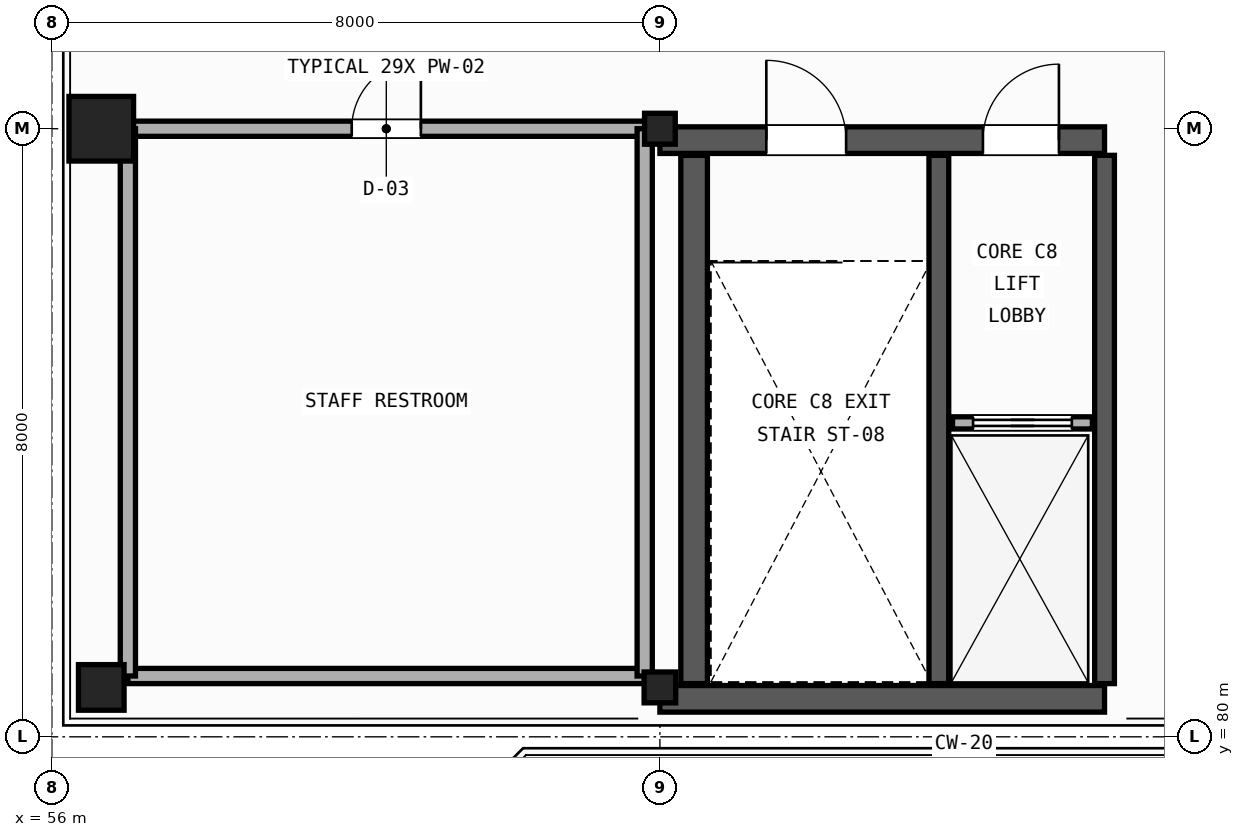
"""IFC4 building model, lengths in metres.
Left out: names, types, materials, properties, quantities, classifications, styles, units other than length and angle.
Written with IfcOpenShell. Run it as: python <this file> out.ifc"""

import sys

from ifc_helpers import new_model, si_unit, direction, frame, frame_2d, origin, origin_2d, place, context, subcontext, project, spatial, rectangle, circle, i_section, extrude, element, fill, save


model = new_model("IFC4")
c1 = context("Model", 3, precision=1e-05, world=origin(), true_north=direction((0.0, 1.0)))
c2 = subcontext(c1, "Body", "Model", "MODEL_VIEW")
j1 = project(units=[si_unit("LENGTHUNIT", "METRE"), si_unit("PLANEANGLEUNIT", "RADIAN")], contexts=[c1])
p1 = place(None, origin())
s1 = spatial("IfcSite", under=j1, at=p1, CompositionType="ELEMENT")
p2 = place(p1, origin())
s2 = spatial("IfcBuilding", under=s1, at=p2, CompositionType="ELEMENT")
p3 = place(p2, frame((0.0, 0.0, 10.2)))
s3 = spatial("IfcBuildingStorey", under=s2, at=p3, CompositionType="ELEMENT", Elevation=10.2)
p4 = place(p3, frame((56.65, 80.65, 0.0), z_axis=(0.0, 0.0, 1.0), x_axis=(1.0, 0.0, 0.0)))
e1 = element("IfcColumn", 1, at=p4, inside=s3, PredefinedType="COLUMN", context=c2, shape_type="SweptSolid", body=[
    extrude(rectangle(XDim=0.6, YDim=0.6, at=origin_2d()), origin(), (0.0, 0.0, 1.0), 4.8),
])
p5 = place(p3, frame((56.65, 88.0, 0.0), z_axis=(0.0, 0.0, 1.0), x_axis=(0.0, 1.0, 0.0)))
e2 = element("IfcColumn", 2, at=p5, inside=s3, PredefinedType="COLUMN", context=c2, shape_type="SweptSolid", body=[
    extrude(circle(Radius=0.425, at=origin_2d()), origin(), (0.0, 0.0, 1.0), 4.8),
])
p6 = place(p3, frame((64.0, 80.65, 0.0), z_axis=(0.0, 0.0, 1.0), x_axis=(0.0, 1.0, 0.0)))
e3 = element("IfcColumn", 3, at=p6, inside=s3, PredefinedType="COLUMN", context=c2, shape_type="SweptSolid", body=[
    extrude(i_section(OverallWidth=0.406, OverallDepth=0.416, WebThickness=0.03, FlangeThickness=0.048, FilletRadius=0.015, at=origin_2d()), origin(), (0.0, 0.0, 1.0), 4.8),
])
p7 = place(p3, frame((64.0, 88.0, 0.0), z_axis=(0.0, 0.0, 1.0), x_axis=(1.0, 0.0, 0.0)))
e4 = element("IfcColumn", 4, at=p7, inside=s3, PredefinedType="COLUMN", context=c2, shape_type="SweptSolid", body=[
    extrude(i_section(OverallWidth=0.404, OverallDepth=0.407, WebThickness=0.027, FlangeThickness=0.044, FilletRadius=0.015, at=origin_2d()), origin(), (0.0, 0.0, 1.0), 6.45),
])
p8 = place(p3, frame((64.0, 87.85, 0.0), z_axis=(0.0, 0.0, 1.0), x_axis=(1.0, 0.0, 0.0)))
e5 = element("IfcWall", 5, at=p8, inside=s3, PredefinedType="SHEAR", context=c2, shape_type="SweptSolid", body=[
    extrude(rectangle(XDim=5.85, YDim=0.35, at=frame_2d((2.925, 0.0))), origin(), (0.0, 0.0, 1.0), 4.3),
])
p9 = place(p8, frame((1.4, 0.0, 0.0)))
e6 = element("IfcOpeningElement", 6, at=p9, cuts=e5, PredefinedType="OPENING", context=c2, shape_type="SweptSolid", body=[
    extrude(rectangle(XDim=1.05, YDim=2.1, at=frame_2d((0.525, 1.05))), frame((0.0, 0.185, 0.0), z_axis=(0.0, -1.0, 0.0), x_axis=(1.0, 0.0, 0.0)), (0.0, 0.0, 1.0), 0.37),
])
p10 = place(p8, frame((4.25, 0.0, 0.0)))
e7 = element("IfcOpeningElement", 7, at=p10, cuts=e5, PredefinedType="OPENING", context=c2, shape_type="SweptSolid", body=[
    extrude(rectangle(XDim=1.0, YDim=2.15, at=frame_2d((0.5, 1.075))), frame((0.0, 0.185, 0.0), z_axis=(0.0, -1.0, 0.0), x_axis=(1.0, 0.0, 0.0)), (0.0, 0.0, 1.0), 0.37),
])
p11 = place(p3, frame((64.0, 80.5, 0.0), z_axis=(0.0, 0.0, 1.0), x_axis=(1.0, 0.0, 0.0)))
e8 = element("IfcWall", 8, at=p11, inside=s3, PredefinedType="SHEAR", context=c2, shape_type="SweptSolid", body=[
    extrude(rectangle(XDim=5.85, YDim=0.35, at=frame_2d((2.925, 0.0))), origin(), (0.0, 0.0, 1.0), 4.3),
])
p12 = place(p3, frame((64.45, 80.7, 0.0), z_axis=(0.0, 0.0, 1.0), x_axis=(0.0, 1.0, 0.0)))
e9 = element("IfcWall", 9, at=p12, inside=s3, PredefinedType="SHEAR", context=c2, shape_type="SweptSolid", body=[
    extrude(rectangle(XDim=6.95, YDim=0.35, at=frame_2d((3.475, 0.0))), origin(), (0.0, 0.0, 1.0), 4.3),
])
for number, where, z_axis, x_axis in (
    (10, (69.85, 80.7, 0.0), (0.0, 0.0, 1.0), (0.0, 1.0, 0.0)),
    (11, (67.67, 80.7, 0.0), (0.0, 0.0, 1.0), (0.0, 1.0, 0.0)),
):
    element("IfcWall", number, at=place(p3, frame(where, z_axis=z_axis, x_axis=x_axis)), inside=s3, PredefinedType="SHEAR", context=c2, shape_type="SweptSolid", body=[
        extrude(rectangle(XDim=6.95, YDim=0.26, at=frame_2d((3.475, 0.0))), origin(), (0.0, 0.0, 1.0), 4.3),
    ])
p13 = place(p3, frame((67.85, 84.13, 0.0), z_axis=(0.0, 0.0, 1.0), x_axis=(1.0, 0.0, 0.0)))
e12 = element("IfcWall", 12, at=p13, inside=s3, PredefinedType="PARTITIONING", context=c2, shape_type="SweptSolid", body=[
    extrude(rectangle(XDim=1.84, YDim=0.16, at=frame_2d((0.92, 0.0))), origin(), (0.0, 0.0, 1.0), 3.6),
])
p14 = place(p13, frame((0.27, 0.0, 0.0)))
e13 = element("IfcOpeningElement", 13, at=p14, cuts=e12, PredefinedType="OPENING", context=c2, shape_type="SweptSolid", body=[
    extrude(rectangle(XDim=1.3, YDim=2.2, at=frame_2d((0.65, 1.1))), frame((0.0, 0.09, 0.0), z_axis=(0.0, -1.0, 0.0), x_axis=(1.0, 0.0, 0.0)), (0.0, 0.0, 1.0), 0.18),
])
p15 = place(p3, frame((57.0, 88.0, 0.0), z_axis=(0.0, 0.0, 1.0), x_axis=(1.0, 0.0, 0.0)))
e14 = element("IfcWall", 14, at=p15, inside=s3, PredefinedType="PLUMBINGWALL", context=c2, shape_type="SweptSolid", body=[
    extrude(rectangle(XDim=6.8, YDim=0.2, at=frame_2d((3.4, 0.0))), origin(), (0.0, 0.0, 1.0), 4.29),
])
p16 = place(p15, frame((2.945, 0.0, 0.0)))
e15 = element("IfcOpeningElement", 15, at=p16, cuts=e14, PredefinedType="OPENING", context=c2, shape_type="SweptSolid", body=[
    extrude(rectangle(XDim=0.91, YDim=2.1, at=frame_2d((0.455, 1.05))), frame((0.0, 0.11, 0.0), z_axis=(0.0, -1.0, 0.0), x_axis=(1.0, 0.0, 0.0)), (0.0, 0.0, 1.0), 0.22),
])
p17 = place(p3, frame((57.0, 80.8, 0.0), z_axis=(0.0, 0.0, 1.0), x_axis=(1.0, 0.0, 0.0)))
e16 = element("IfcWall", 16, at=p17, inside=s3, PredefinedType="PLUMBINGWALL", context=c2, shape_type="SweptSolid", body=[
    extrude(rectangle(XDim=6.8, YDim=0.2, at=frame_2d((3.4, 0.0))), origin(), (0.0, 0.0, 1.0), 4.047),
])
for number, where, z_axis, x_axis in (
    (17, (57.0, 80.8, 0.0), (0.0, 0.0, 1.0), (0.0, 1.0, 0.0)),
    (18, (63.8, 80.8, 0.0), (0.0, 0.0, 1.0), (0.0, 1.0, 0.0)),
):
    element("IfcWall", number, at=place(p3, frame(where, z_axis=z_axis, x_axis=x_axis)), inside=s3, PredefinedType="PLUMBINGWALL", context=c2, shape_type="SweptSolid", body=[
        extrude(rectangle(XDim=7.2, YDim=0.2, at=frame_2d((3.6, 0.0))), origin(), (0.0, 0.0, 1.0), 4.29),
    ])
p18 = place(p14, origin())
e19 = element("IfcDoor", 19, at=p18, inside=s3, OperationType="SLIDING_TO_LEFT", PredefinedType="DOOR", context=c2, shape_type="SweptSolid", body=[
    extrude(rectangle(XDim=1.3, YDim=2.2, at=frame_2d((0.65, 1.1))), frame((0.0, 0.025, 0.0), z_axis=(0.0, -1.0, 0.0), x_axis=(1.0, 0.0, 0.0)), (0.0, 0.0, 1.0), 0.05),
])
fill(e13, e19)
p19 = place(p9, origin())
e20 = element("IfcDoor", 20, at=p19, inside=s3, OperationType="SINGLE_SWING_LEFT", PredefinedType="DOOR", context=c2, shape_type="SweptSolid", body=[
    extrude(rectangle(XDim=1.05, YDim=2.1, at=frame_2d((0.525, 1.05))), frame((0.0, 0.025, 0.0), z_axis=(0.0, -1.0, 0.0), x_axis=(1.0, 0.0, 0.0)), (0.0, 0.0, 1.0), 0.05),
])
fill(e6, e20)
p20 = place(p10, origin())
e21 = element("IfcDoor", 21, at=p20, inside=s3, OperationType="SINGLE_SWING_RIGHT", PredefinedType="DOOR", context=c2, shape_type="SweptSolid", body=[
    extrude(rectangle(XDim=1.0, YDim=2.15, at=frame_2d((0.5, 1.075))), frame((0.0, 0.025, 0.0), z_axis=(0.0, -1.0, 0.0), x_axis=(1.0, 0.0, 0.0)), (0.0, 0.0, 1.0), 0.05),
])
fill(e7, e21)
p21 = place(p16, origin())
e22 = element("IfcDoor", 22, at=p21, inside=s3, OperationType="SINGLE_SWING_RIGHT", PredefinedType="DOOR", context=c2, shape_type="SweptSolid", body=[
    extrude(rectangle(XDim=0.91, YDim=2.1, at=frame_2d((0.455, 1.05))), frame((0.0, 0.025, 0.0), z_axis=(0.0, -1.0, 0.0), x_axis=(1.0, 0.0, 0.0)), (0.0, 0.0, 1.0), 0.05),
])
fill(e15, e22)
save(model, sys.argv[1])
